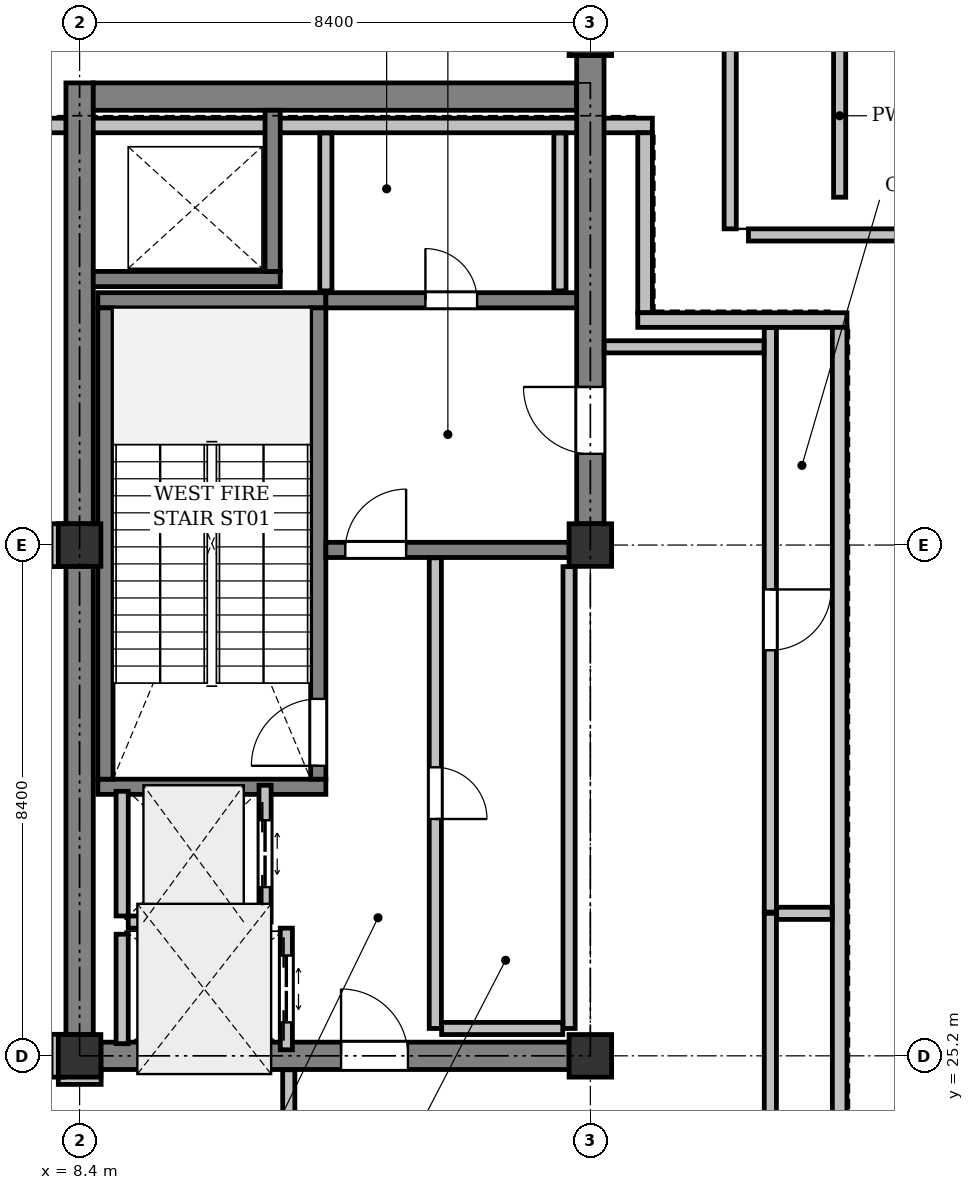
"""IFC4 building model, lengths in metres.
Left out: names, types, materials, properties, quantities, classifications, styles, units other than length and angle.
Written with IfcOpenShell. Run it as: python <this file> out.ifc"""

import sys

from ifc_helpers import new_model, si_unit, direction, frame, frame_2d, origin, origin_2d, place, context, subcontext, project, spatial, rectangle, extrude, element, fill, save


model = new_model("IFC4")
c1 = context("Model", 3, precision=1e-05, world=origin(), true_north=direction((0.0, 1.0)))
c2 = subcontext(c1, "Body", "Model", "MODEL_VIEW")
j1 = project(units=[si_unit("LENGTHUNIT", "METRE"), si_unit("PLANEANGLEUNIT", "RADIAN")], contexts=[c1])
p1 = place(None, origin())
s1 = spatial("IfcSite", under=j1, at=p1, CompositionType="ELEMENT")
p2 = place(p1, origin())
s2 = spatial("IfcBuilding", under=s1, at=p2, CompositionType="ELEMENT")
p3 = place(p2, frame((0.0, 0.0, 333.0)))
s3 = spatial("IfcBuildingStorey", under=s2, at=p3, CompositionType="ELEMENT", Elevation=333.0)
for number, where, z_axis, x_axis in (
    (1, (8.4, 25.2, 0.0), (0.0, 0.0, 1.0), (1.0, 0.0, 0.0)),
    (2, (8.4, 33.6, 0.0), (0.0, 0.0, 1.0), (1.0, 0.0, 0.0)),
    (3, (16.8, 25.2, 0.0), (0.0, 0.0, 1.0), (1.0, 0.0, 0.0)),
    (4, (16.8, 33.6, 0.0), (0.0, 0.0, 1.0), (1.0, 0.0, 0.0)),
    (5, (16.8, 42.0, 0.0), (0.0, 0.0, 1.0), (1.0, 0.0, 0.0)),
):
    element("IfcColumn", number, at=place(p3, frame(where, z_axis=z_axis, x_axis=x_axis)), inside=s3, PredefinedType="COLUMN", context=c2, shape_type="SweptSolid", body=[
        extrude(rectangle(XDim=0.7, YDim=0.7, at=origin_2d()), origin(), (0.0, 0.0, 1.0), 5.05),
    ])
p4 = place(p3, frame((20.9, 39.32, 0.0), z_axis=(0.0, 0.0, 1.0), x_axis=(0.0, 1.0, 0.0)))
e6 = element("IfcWall", 6, at=p4, inside=s3, PredefinedType="PARAPET", context=c2, shape_type="SweptSolid", body=[
    extrude(rectangle(XDim=2.68, YDim=0.2, at=frame_2d((1.34, 0.0))), origin(), (0.0, 0.0, 1.0), 1.15),
])
for number, where, z_axis, x_axis in (
    (7, (19.1, 41.8, 0.0), (0.0, 0.0, 1.0), (0.0, -1.0, 0.0)),
    (8, (19.4, 38.7, 0.0), (0.0, 0.0, 1.0), (1.0, 0.0, 0.0)),
):
    element("IfcWall", number, at=place(p3, frame(where, z_axis=z_axis, x_axis=x_axis)), inside=s3, PredefinedType="PARAPET", context=c2, shape_type="SweptSolid", body=[
        extrude(rectangle(XDim=3.0, YDim=0.2, at=frame_2d((1.5, 0.0))), origin(), (0.0, 0.0, 1.0), 1.15),
    ])
p5 = place(p3, frame((7.547, 40.5, 0.0), z_axis=(0.0, 0.0, 1.0), x_axis=(1.0, 0.0, 0.0)))
e9 = element("IfcWall", 9, at=p5, inside=s3, PredefinedType="STANDARD", context=c2, shape_type="SweptSolid", body=[
    extrude(rectangle(XDim=10.273, YDim=0.24, at=frame_2d((5.137, 0.0))), origin(), (0.0, 0.0, 1.0), 4.743),
])
p6 = place(p3, frame((17.7, 40.38, 0.0), z_axis=(0.0, 0.0, 1.0), x_axis=(0.0, -1.0, 0.0)))
e10 = element("IfcWall", 10, at=p6, inside=s3, PredefinedType="STANDARD", context=c2, shape_type="SweptSolid", body=[
    extrude(rectangle(XDim=2.96, YDim=0.24, at=frame_2d((1.48, 0.0))), origin(), (0.0, 0.0, 1.0), 5.05),
])
p7 = place(p3, frame((17.58, 37.3, 0.0), z_axis=(0.0, 0.0, 1.0), x_axis=(1.0, 0.0, 0.0)))
e11 = element("IfcWall", 11, at=p7, inside=s3, PredefinedType="STANDARD", context=c2, shape_type="SweptSolid", body=[
    extrude(rectangle(XDim=3.44, YDim=0.24, at=frame_2d((1.72, 0.0))), origin(), (0.0, 0.0, 1.0), 5.05),
])
p8 = place(p3, frame((20.9, 37.18, 0.0), z_axis=(0.0, 0.0, 1.0), x_axis=(0.0, -1.0, 0.0)))
e12 = element("IfcWall", 12, at=p8, inside=s3, PredefinedType="STANDARD", context=c2, shape_type="SweptSolid", body=[
    extrude(rectangle(XDim=16.16, YDim=0.24, at=frame_2d((8.08, 0.0))), origin(), (0.0, 0.0, 1.0), 5.05),
])
p9 = place(p3, frame((8.4, 25.55, 0.0), z_axis=(0.0, 0.0, 1.0), x_axis=(0.0, 1.0, 0.0)))
e13 = element("IfcWall", 13, at=p9, inside=s3, PredefinedType="SHEAR", context=c2, shape_type="SweptSolid", body=[
    extrude(rectangle(XDim=7.7, YDim=0.45, at=frame_2d((3.85, 0.0))), origin(), (0.0, 0.0, 1.0), 5.05),
])
p10 = place(p3, frame((8.4, 33.95, 0.0), z_axis=(0.0, 0.0, 1.0), x_axis=(0.0, 1.0, 0.0)))
e14 = element("IfcWall", 14, at=p10, inside=s3, PredefinedType="SHEAR", context=c2, shape_type="SweptSolid", body=[
    extrude(rectangle(XDim=7.25, YDim=0.45, at=frame_2d((3.625, 0.0))), origin(), (0.0, 0.0, 1.0), 5.05),
])
p11 = place(p3, frame((8.625, 40.975, 0.0), z_axis=(0.0, 0.0, 1.0), x_axis=(1.0, 0.0, 0.0)))
e15 = element("IfcWall", 15, at=p11, inside=s3, PredefinedType="SHEAR", context=c2, shape_type="SweptSolid", body=[
    extrude(rectangle(XDim=7.95, YDim=0.45, at=frame_2d((3.975, 0.0))), origin(), (0.0, 0.0, 1.0), 5.05),
])
p12 = place(p3, frame((16.8, 33.95, 0.0), z_axis=(0.0, 0.0, 1.0), x_axis=(0.0, 1.0, 0.0)))
e16 = element("IfcWall", 16, at=p12, inside=s3, PredefinedType="SHEAR", context=c2, shape_type="SweptSolid", body=[
    extrude(rectangle(XDim=7.7, YDim=0.45, at=frame_2d((3.85, 0.0))), origin(), (0.0, 0.0, 1.0), 5.05),
])
p13 = place(p12, frame((1.15, 0.0, 0.0)))
e17 = element("IfcOpeningElement", 17, at=p13, cuts=e16, PredefinedType="OPENING", context=c2, shape_type="SweptSolid", body=[
    extrude(rectangle(XDim=1.1, YDim=2.15, at=frame_2d((0.55, 1.075))), frame((0.0, 0.235, 0.0), z_axis=(0.0, -1.0, 0.0), x_axis=(1.0, 0.0, 0.0)), (0.0, 0.0, 1.0), 0.47),
])
p14 = place(p3, frame((8.75, 25.2, 0.0), z_axis=(0.0, 0.0, 1.0), x_axis=(1.0, 0.0, 0.0)))
e18 = element("IfcWall", 18, at=p14, inside=s3, PredefinedType="SHEAR", context=c2, shape_type="SweptSolid", body=[
    extrude(rectangle(XDim=7.7, YDim=0.45, at=frame_2d((3.85, 0.0))), origin(), (0.0, 0.0, 1.0), 5.05),
])
p15 = place(p14, frame((3.95, 0.0, 0.0)))
e19 = element("IfcOpeningElement", 19, at=p15, cuts=e18, PredefinedType="OPENING", context=c2, shape_type="SweptSolid", body=[
    extrude(rectangle(XDim=1.1, YDim=2.15, at=frame_2d((0.55, 1.075))), frame((0.0, 0.235, 0.0), z_axis=(0.0, -1.0, 0.0), x_axis=(1.0, 0.0, 0.0)), (0.0, 0.0, 1.0), 0.47),
])
for number, where, z_axis, x_axis in (
    (20, (12.45, 29.625, 0.0), (0.0, 0.0, 1.0), (-1.0, 0.0, 0.0)),
    (21, (12.45, 37.625, 0.0), (0.0, 0.0, 1.0), (-1.0, 0.0, 0.0)),
):
    element("IfcWall", number, at=place(p3, frame(where, z_axis=z_axis, x_axis=x_axis)), inside=s3, PredefinedType="SHEAR", context=c2, shape_type="SweptSolid", body=[
        extrude(rectangle(XDim=3.75, YDim=0.25, at=frame_2d((1.875, 0.0))), origin(), (0.0, 0.0, 1.0), 5.05),
    ])
p16 = place(p3, frame((12.325, 29.75, 0.0), z_axis=(0.0, 0.0, 1.0), x_axis=(0.0, 1.0, 0.0)))
e22 = element("IfcWall", 22, at=p16, inside=s3, PredefinedType="SHEAR", context=c2, shape_type="SweptSolid", body=[
    extrude(rectangle(XDim=7.75, YDim=0.25, at=frame_2d((3.875, 0.0))), origin(), (0.0, 0.0, 1.0), 5.05),
])
p17 = place(p16, frame((0.22, 0.0, 0.0)))
e23 = element("IfcOpeningElement", 23, at=p17, cuts=e22, PredefinedType="OPENING", context=c2, shape_type="SweptSolid", body=[
    extrude(rectangle(XDim=1.1, YDim=2.15, at=frame_2d((0.55, 1.075))), frame((0.0, 0.135, 0.0), z_axis=(0.0, -1.0, 0.0), x_axis=(1.0, 0.0, 0.0)), (0.0, 0.0, 1.0), 0.27),
])
p18 = place(p3, frame((8.825, 29.75, 0.0), z_axis=(0.0, 0.0, 1.0), x_axis=(0.0, 1.0, 0.0)))
e24 = element("IfcWall", 24, at=p18, inside=s3, PredefinedType="SHEAR", context=c2, shape_type="SweptSolid", body=[
    extrude(rectangle(XDim=7.75, YDim=0.25, at=frame_2d((3.875, 0.0))), origin(), (0.0, 0.0, 1.0), 5.05),
])
p19 = place(p3, frame((8.625, 37.975, 0.0), z_axis=(0.0, 0.0, 1.0), x_axis=(1.0, 0.0, 0.0)))
e25 = element("IfcWall", 25, at=p19, inside=s3, PredefinedType="SHEAR", context=c2, shape_type="SweptSolid", body=[
    extrude(rectangle(XDim=3.075, YDim=0.25, at=frame_2d((1.538, 0.0))), origin(), (0.0, 0.0, 1.0), 5.05),
])
p20 = place(p3, frame((11.575, 38.1, 0.0), z_axis=(0.0, 0.0, 1.0), x_axis=(0.0, 1.0, 0.0)))
e26 = element("IfcWall", 26, at=p20, inside=s3, PredefinedType="SHEAR", context=c2, shape_type="SweptSolid", body=[
    extrude(rectangle(XDim=2.65, YDim=0.25, at=frame_2d((1.325, 0.0))), origin(), (0.0, 0.0, 1.0), 5.05),
])
p21 = place(p3, frame((12.45, 33.52, 0.0), z_axis=(0.0, 0.0, 1.0), x_axis=(1.0, 0.0, 0.0)))
e27 = element("IfcWall", 27, at=p21, inside=s3, PredefinedType="SHEAR", context=c2, shape_type="SweptSolid", body=[
    extrude(rectangle(XDim=4.0, YDim=0.25, at=frame_2d((2.0, 0.0))), origin(), (0.0, 0.0, 1.0), 5.05),
])
p22 = place(p21, frame((0.32, 0.0, 0.0)))
e28 = element("IfcOpeningElement", 28, at=p22, cuts=e27, PredefinedType="OPENING", context=c2, shape_type="SweptSolid", body=[
    extrude(rectangle(XDim=1.0, YDim=2.15, at=frame_2d((0.5, 1.075))), frame((0.0, 0.135, 0.0), z_axis=(0.0, -1.0, 0.0), x_axis=(1.0, 0.0, 0.0)), (0.0, 0.0, 1.0), 0.27),
])
p23 = place(p3, frame((12.45, 37.625, 0.0), z_axis=(0.0, 0.0, 1.0), x_axis=(1.0, 0.0, 0.0)))
e29 = element("IfcWall", 29, at=p23, inside=s3, PredefinedType="SHEAR", context=c2, shape_type="SweptSolid", body=[
    extrude(rectangle(XDim=4.125, YDim=0.25, at=frame_2d((2.062, 0.0))), origin(), (0.0, 0.0, 1.0), 5.05),
])
p24 = place(p23, frame((1.637, 0.0, 0.0)))
e30 = element("IfcOpeningElement", 30, at=p24, cuts=e29, PredefinedType="OPENING", context=c2, shape_type="SweptSolid", body=[
    extrude(rectangle(XDim=0.85, YDim=2.15, at=frame_2d((0.425, 1.075))), frame((0.0, 0.135, 0.0), z_axis=(0.0, -1.0, 0.0), x_axis=(1.0, 0.0, 0.0)), (0.0, 0.0, 1.0), 0.27),
])
p25 = place(p3, frame((11.45, 27.4, 0.0), z_axis=(0.0, 0.0, 1.0), x_axis=(0.0, 1.0, 0.0)))
e31 = element("IfcWall", 31, at=p25, inside=s3, PredefinedType="PARTITIONING", context=c2, shape_type="SweptSolid", body=[
    extrude(rectangle(XDim=2.25, YDim=0.2, at=frame_2d((1.125, 0.0))), origin(), (0.0, 0.0, 1.0), 5.05),
])
p26 = place(p25, frame((0.575, 0.0, 0.0)))
e32 = element("IfcOpeningElement", 32, at=p26, cuts=e31, PredefinedType="OPENING", context=c2, shape_type="SweptSolid", body=[
    extrude(rectangle(XDim=1.1, YDim=2.2, at=frame_2d((0.55, 1.1))), frame((0.0, 0.11, 0.0), z_axis=(0.0, -1.0, 0.0), x_axis=(1.0, 0.0, 0.0)), (0.0, 0.0, 1.0), 0.22),
])
p27 = place(p3, frame((9.1, 27.5, 0.0), z_axis=(0.0, 0.0, 1.0), x_axis=(0.0, 1.0, 0.0)))
e33 = element("IfcWall", 33, at=p27, inside=s3, PredefinedType="PARTITIONING", context=c2, shape_type="SweptSolid", body=[
    extrude(rectangle(XDim=2.05, YDim=0.2, at=frame_2d((1.025, 0.0))), origin(), (0.0, 0.0, 1.0), 5.05),
])
p28 = place(p3, frame((9.2, 27.4, 0.0), z_axis=(0.0, 0.0, 1.0), x_axis=(1.0, 0.0, 0.0)))
e34 = element("IfcWall", 34, at=p28, inside=s3, PredefinedType="PARTITIONING", context=c2, shape_type="SweptSolid", body=[
    extrude(rectangle(XDim=2.15, YDim=0.2, at=frame_2d((1.075, 0.0))), origin(), (0.0, 0.0, 1.0), 5.05),
])
p29 = place(p3, frame((11.8, 25.3, 0.0), z_axis=(0.0, 0.0, 1.0), x_axis=(0.0, 1.0, 0.0)))
e35 = element("IfcWall", 35, at=p29, inside=s3, PredefinedType="PARTITIONING", context=c2, shape_type="SweptSolid", body=[
    extrude(rectangle(XDim=2.0, YDim=0.2, at=frame_2d((1.0, 0.0))), origin(), (0.0, 0.0, 1.0), 5.05),
])
p30 = place(p29, frame((0.45, 0.0, 0.0)))
e36 = element("IfcOpeningElement", 36, at=p30, cuts=e35, PredefinedType="OPENING", context=c2, shape_type="SweptSolid", body=[
    extrude(rectangle(XDim=1.1, YDim=2.2, at=frame_2d((0.55, 1.1))), frame((0.0, 0.11, 0.0), z_axis=(0.0, -1.0, 0.0), x_axis=(1.0, 0.0, 0.0)), (0.0, 0.0, 1.0), 0.22),
])
p31 = place(p3, frame((9.1, 25.4, 0.0), z_axis=(0.0, 0.0, 1.0), x_axis=(0.0, 1.0, 0.0)))
e37 = element("IfcWall", 37, at=p31, inside=s3, PredefinedType="PARTITIONING", context=c2, shape_type="SweptSolid", body=[
    extrude(rectangle(XDim=1.8, YDim=0.2, at=frame_2d((0.9, 0.0))), origin(), (0.0, 0.0, 1.0), 5.05),
])
p32 = place(p3, frame((16.45, 25.65, 0.0), z_axis=(0.0, 0.0, 1.0), x_axis=(0.0, 1.0, 0.0)))
e38 = element("IfcWall", 38, at=p32, inside=s3, PredefinedType="PARTITIONING", context=c2, shape_type="SweptSolid", body=[
    extrude(rectangle(XDim=7.595, YDim=0.2, at=frame_2d((3.798, 0.0))), origin(), (0.0, 0.0, 1.0), 5.05),
])
p33 = place(p3, frame((14.25, 33.39, 0.0), z_axis=(0.0, 0.0, 1.0), x_axis=(0.0, -1.0, 0.0)))
e39 = element("IfcWall", 39, at=p33, inside=s3, PredefinedType="PARTITIONING", context=c2, shape_type="SweptSolid", body=[
    extrude(rectangle(XDim=7.74, YDim=0.2, at=frame_2d((3.87, 0.0))), origin(), (0.0, 0.0, 1.0), 5.05),
])
p34 = place(p33, frame((3.445, 0.0, 0.0)))
e40 = element("IfcOpeningElement", 40, at=p34, cuts=e39, PredefinedType="OPENING", context=c2, shape_type="SweptSolid", body=[
    extrude(rectangle(XDim=0.85, YDim=2.15, at=frame_2d((0.425, 1.075))), frame((0.0, 0.11, 0.0), z_axis=(0.0, -1.0, 0.0), x_axis=(1.0, 0.0, 0.0)), (0.0, 0.0, 1.0), 0.22),
])
p35 = place(p3, frame((14.354, 25.65, 0.0), z_axis=(0.0, 0.0, 1.0), x_axis=(1.0, 0.0, 0.0)))
e41 = element("IfcWall", 41, at=p35, inside=s3, PredefinedType="PARTITIONING", context=c2, shape_type="SweptSolid", body=[
    extrude(rectangle(XDim=1.992, YDim=0.2, at=frame_2d((0.996, 0.0))), origin(), (0.0, 0.0, 1.0), 5.05),
])
for number, where, z_axis, x_axis in (
    (42, (16.3, 37.78, 0.0), (0.0, 0.0, 1.0), (0.0, 1.0, 0.0)),
    (43, (12.45, 40.376, 0.0), (0.0, 0.0, 1.0), (0.0, -1.0, 0.0)),
):
    element("IfcWall", number, at=place(p3, frame(where, z_axis=z_axis, x_axis=x_axis)), inside=s3, PredefinedType="PARTITIONING", context=c2, shape_type="SweptSolid", body=[
        extrude(rectangle(XDim=2.596, YDim=0.2, at=frame_2d((1.298, 0.0))), origin(), (0.0, 0.0, 1.0), 5.05),
    ])
p36 = place(p3, frame((11.84, 22.85, 0.0), z_axis=(0.0, 0.0, 1.0), x_axis=(0.0, 1.0, 0.0)))
e44 = element("IfcWall", 44, at=p36, inside=s3, PredefinedType="PARTITIONING", context=c2, shape_type="SweptSolid", body=[
    extrude(rectangle(XDim=2.121, YDim=0.2, at=frame_2d((1.061, 0.0))), origin(), (0.0, 0.0, 1.0), 5.05),
])
p37 = place(p3, frame((8.754, 24.83, 0.0), z_axis=(0.0, 0.0, 1.0), x_axis=(-0.999999939844, -0.000346860888, 0.0)))
e45 = element("IfcWall", 45, at=p37, inside=s3, PredefinedType="PARTITIONING", context=c2, shape_type="SweptSolid", body=[
    extrude(rectangle(XDim=0.704, YDim=0.2, at=frame_2d((0.352, 0.0))), origin(), (0.0, 0.0, 1.0), 4.743),
])
for number, where, z_axis, x_axis in (
    (46, (8.03, 24.85, 0.0), (0.0, 0.0, 1.0), (0.001, 1.0, 0.0)),
    (47, (8.031, 33.246, 0.0), (0.0, 0.0, 1.0), (-0.001, 1.0, 0.0)),
):
    element("IfcWall", number, at=place(p3, frame(where, z_axis=z_axis, x_axis=x_axis)), inside=s3, PredefinedType="PARTITIONING", context=c2, shape_type="SweptSolid", body=[
        extrude(rectangle(XDim=0.704, YDim=0.2, at=frame_2d((0.352, 0.0))), origin(), (0.0, 0.0, 1.0), 5.05),
    ])
p38 = place(p3, frame((19.76, 27.544, 0.0), z_axis=(0.0, 0.0, 1.0), x_axis=(0.0, -1.0, 0.0)))
e48 = element("IfcWall", 48, at=p38, inside=s3, PredefinedType="PARTITIONING", context=c2, shape_type="SweptSolid", body=[
    extrude(rectangle(XDim=10.519, YDim=0.2, at=frame_2d((5.259, 0.0))), origin(), (0.0, 0.0, 1.0), 5.05),
])
p39 = place(p38, frame((4.76, 0.0, 0.0)))
e49 = element("IfcOpeningElement", 49, at=p39, cuts=e48, PredefinedType="OPENING", context=c2, shape_type="SweptSolid", body=[
    extrude(rectangle(XDim=1.0, YDim=2.15, at=frame_2d((0.5, 1.075))), frame((0.0, 0.11, 0.0), z_axis=(0.0, -1.0, 0.0), x_axis=(1.0, 0.0, 0.0)), (0.0, 0.0, 1.0), 0.22),
])
p40 = place(p3, frame((20.776, 27.544, 0.0), z_axis=(0.0, 0.0, 1.0), x_axis=(-1.0, 0.0, 0.0)))
e50 = element("IfcWall", 50, at=p40, inside=s3, PredefinedType="PARTITIONING", context=c2, shape_type="SweptSolid", body=[
    extrude(rectangle(XDim=0.912, YDim=0.2, at=frame_2d((0.456, 0.0))), origin(), (0.0, 0.0, 1.0), 5.05),
])
p41 = place(p3, frame((19.76, 37.176, 0.0), z_axis=(0.0, 0.0, 1.0), x_axis=(0.0, -1.0, 0.0)))
e51 = element("IfcWall", 51, at=p41, inside=s3, PredefinedType="PARTITIONING", context=c2, shape_type="SweptSolid", body=[
    extrude(rectangle(XDim=9.612, YDim=0.2, at=frame_2d((4.806, 0.0))), origin(), (0.0, 0.0, 1.0), 5.05),
])
p42 = place(p41, frame((4.306, 0.0, 0.0)))
e52 = element("IfcOpeningElement", 52, at=p42, cuts=e51, PredefinedType="OPENING", context=c2, shape_type="SweptSolid", body=[
    extrude(rectangle(XDim=1.0, YDim=2.15, at=frame_2d((0.5, 1.075))), frame((0.0, 0.11, 0.0), z_axis=(0.0, -1.0, 0.0), x_axis=(1.0, 0.0, 0.0)), (0.0, 0.0, 1.0), 0.22),
])
p43 = place(p3, frame((17.029, 36.86, 0.0), z_axis=(0.0, 0.0, 1.0), x_axis=(1.0, 0.0, 0.0)))
e53 = element("IfcWall", 53, at=p43, inside=s3, PredefinedType="PARTITIONING", context=c2, shape_type="SweptSolid", body=[
    extrude(rectangle(XDim=2.627, YDim=0.2, at=frame_2d((1.313, 0.0))), origin(), (0.0, 0.0, 1.0), 5.05),
])
p44 = place(p13, origin())
e54 = element("IfcDoor", 54, at=p44, inside=s3, OperationType="SINGLE_SWING_RIGHT", PredefinedType="DOOR", context=c2, shape_type="SweptSolid", body=[
    extrude(rectangle(XDim=1.1, YDim=2.15, at=frame_2d((0.55, 1.075))), frame((0.0, 0.025, 0.0), z_axis=(0.0, -1.0, 0.0), x_axis=(1.0, 0.0, 0.0)), (0.0, 0.0, 1.0), 0.05),
])
fill(e17, e54)
p45 = place(p15, origin())
e55 = element("IfcDoor", 55, at=p45, inside=s3, OperationType="SINGLE_SWING_LEFT", PredefinedType="DOOR", context=c2, shape_type="SweptSolid", body=[
    extrude(rectangle(XDim=1.1, YDim=2.15, at=frame_2d((0.55, 1.075))), frame((0.0, 0.025, 0.0), z_axis=(0.0, -1.0, 0.0), x_axis=(1.0, 0.0, 0.0)), (0.0, 0.0, 1.0), 0.05),
])
fill(e19, e55)
p46 = place(p17, origin())
e56 = element("IfcDoor", 56, at=p46, inside=s3, OperationType="SINGLE_SWING_LEFT", PredefinedType="DOOR", context=c2, shape_type="SweptSolid", body=[
    extrude(rectangle(XDim=1.1, YDim=2.15, at=frame_2d((0.55, 1.075))), frame((0.0, 0.025, 0.0), z_axis=(0.0, -1.0, 0.0), x_axis=(1.0, 0.0, 0.0)), (0.0, 0.0, 1.0), 0.05),
])
fill(e23, e56)
p47 = place(p22, origin())
e57 = element("IfcDoor", 57, at=p47, inside=s3, OperationType="SINGLE_SWING_RIGHT", PredefinedType="DOOR", context=c2, shape_type="SweptSolid", body=[
    extrude(rectangle(XDim=1.0, YDim=2.15, at=frame_2d((0.5, 1.075))), frame((0.0, 0.025, 0.0), z_axis=(0.0, -1.0, 0.0), x_axis=(1.0, 0.0, 0.0)), (0.0, 0.0, 1.0), 0.05),
])
fill(e28, e57)
p48 = place(p26, origin())
e58 = element("IfcDoor", 58, at=p48, inside=s3, OperationType="DOUBLE_DOOR_SLIDING", PredefinedType="DOOR", context=c2, shape_type="SweptSolid", body=[
    extrude(rectangle(XDim=1.1, YDim=2.2, at=frame_2d((0.55, 1.1))), frame((0.0, 0.025, 0.0), z_axis=(0.0, -1.0, 0.0), x_axis=(1.0, 0.0, 0.0)), (0.0, 0.0, 1.0), 0.05),
])
fill(e32, e58)
p49 = place(p30, origin())
e59 = element("IfcDoor", 59, at=p49, inside=s3, OperationType="DOUBLE_DOOR_SLIDING", PredefinedType="DOOR", context=c2, shape_type="SweptSolid", body=[
    extrude(rectangle(XDim=1.1, YDim=2.2, at=frame_2d((0.55, 1.1))), frame((0.0, 0.025, 0.0), z_axis=(0.0, -1.0, 0.0), x_axis=(1.0, 0.0, 0.0)), (0.0, 0.0, 1.0), 0.05),
])
fill(e36, e59)
p50 = place(p34, origin())
e60 = element("IfcDoor", 60, at=p50, inside=s3, OperationType="SINGLE_SWING_RIGHT", PredefinedType="DOOR", context=c2, shape_type="SweptSolid", body=[
    extrude(rectangle(XDim=0.85, YDim=2.15, at=frame_2d((0.425, 1.075))), frame((0.0, 0.025, 0.0), z_axis=(0.0, -1.0, 0.0), x_axis=(1.0, 0.0, 0.0)), (0.0, 0.0, 1.0), 0.05),
])
fill(e40, e60)
p51 = place(p24, origin())
e61 = element("IfcDoor", 61, at=p51, inside=s3, OperationType="SINGLE_SWING_LEFT", PredefinedType="DOOR", context=c2, shape_type="SweptSolid", body=[
    extrude(rectangle(XDim=0.85, YDim=2.15, at=frame_2d((0.425, 1.075))), frame((0.0, 0.025, 0.0), z_axis=(0.0, -1.0, 0.0), x_axis=(1.0, 0.0, 0.0)), (0.0, 0.0, 1.0), 0.05),
])
fill(e30, e61)
p52 = place(p42, origin())
e62 = element("IfcDoor", 62, at=p52, inside=s3, OperationType="SINGLE_SWING_LEFT", PredefinedType="DOOR", context=c2, shape_type="SweptSolid", body=[
    extrude(rectangle(XDim=1.0, YDim=2.15, at=frame_2d((0.5, 1.075))), frame((0.0, 0.025, 0.0), z_axis=(0.0, -1.0, 0.0), x_axis=(1.0, 0.0, 0.0)), (0.0, 0.0, 1.0), 0.05),
])
fill(e52, e62)
save(model, sys.argv[1])
